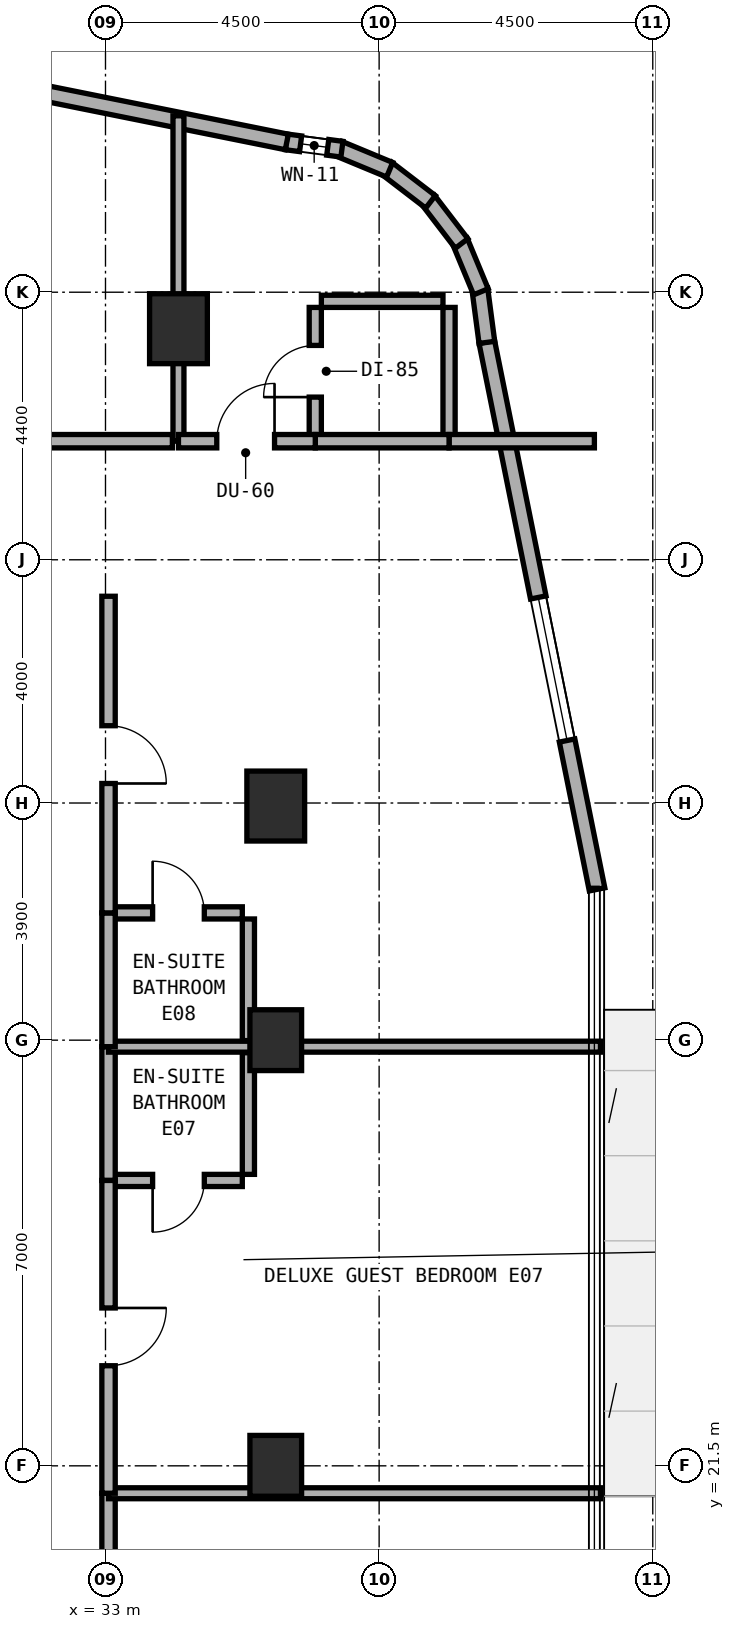
"""IFC4 building model, lengths in metres.
Left out: names, types, materials, properties, quantities, classifications, styles, units other than length and angle.
Written with IfcOpenShell. Run it as: python <this file> out.ifc"""

import sys

from ifc_helpers import new_model, si_unit, direction, frame, frame_2d, origin, origin_2d, place, context, subcontext, project, spatial, rectangle, extrude, element, fill, save


model = new_model("IFC4")
c1 = context("Model", 3, precision=1e-05, world=origin(), true_north=direction((0.0, 1.0)))
c2 = subcontext(c1, "Body", "Model", "MODEL_VIEW")
j1 = project(units=[si_unit("LENGTHUNIT", "METRE"), si_unit("PLANEANGLEUNIT", "RADIAN")], contexts=[c1])
p1 = place(None, origin())
s1 = spatial("IfcSite", under=j1, at=p1, CompositionType="ELEMENT")
p2 = place(p1, origin())
s2 = spatial("IfcBuilding", under=s1, at=p2, CompositionType="ELEMENT")
p3 = place(p2, frame((0.0, 0.0, 124.0)))
s3 = spatial("IfcBuildingStorey", under=s2, at=p3, CompositionType="ELEMENT", Elevation=124.0)
p4 = place(p3, frame((34.2, 40.2, 0.0), z_axis=(0.0, 0.0, 1.0), x_axis=(1.0, 0.0, 0.0)))
e1 = element("IfcColumn", 1, at=p4, inside=s3, PredefinedType="COLUMN", context=c2, shape_type="SweptSolid", body=[
    extrude(rectangle(XDim=0.95, YDim=1.15, at=origin_2d()), origin(), (0.0, 0.0, 1.0), 3.5),
])
for number, where, z_axis, x_axis in (
    (2, (35.8, 21.5, 0.0), (0.0, 0.0, 1.0), (1.0, 0.0, 0.0)),
    (3, (35.8, 28.5, 0.0), (0.0, 0.0, 1.0), (1.0, 0.0, 0.0)),
):
    element("IfcColumn", number, at=place(p3, frame(where, z_axis=z_axis, x_axis=x_axis)), inside=s3, PredefinedType="COLUMN", context=c2, shape_type="SweptSolid", body=[
        extrude(rectangle(XDim=0.85, YDim=1.0, at=origin_2d()), origin(), (0.0, 0.0, 1.0), 3.5),
    ])
p5 = place(p3, frame((35.8, 32.35, 0.0), z_axis=(0.0, 0.0, 1.0), x_axis=(1.0, 0.0, 0.0)))
e4 = element("IfcColumn", 4, at=p5, inside=s3, PredefinedType="COLUMN", context=c2, shape_type="SweptSolid", body=[
    extrude(rectangle(XDim=0.95, YDim=1.15, at=origin_2d()), origin(), (0.0, 0.0, 1.0), 3.5),
])
p6 = place(p3, frame((41.084, 30.98, 0.0), z_axis=(0.0, 0.0, 1.0), x_axis=(-0.197435082048, 0.980315963543, 0.0)))
e5 = element("IfcWall", 5, at=p6, inside=s3, PredefinedType="STANDARD", context=c2, shape_type="SweptSolid", body=[
    extrude(rectangle(XDim=9.183, YDim=0.26, at=frame_2d((4.591, 0.0))), origin(), (0.0, 0.0, 1.0), 3.22),
])
p7 = place(p6, frame((2.497, 0.0, 0.8)))
e6 = element("IfcOpeningElement", 6, at=p7, cuts=e5, PredefinedType="OPENING", context=c2, shape_type="SweptSolid", body=[
    extrude(rectangle(XDim=2.4, YDim=1.6, at=frame_2d((1.2, 0.8))), frame((0.0, 0.14, 0.0), z_axis=(0.0, -1.0, 0.0), x_axis=(1.0, 0.0, 0.0)), (0.0, 0.0, 1.0), 0.28),
])
p8 = place(p3, frame((39.272, 39.975, 0.0), z_axis=(0.0, 0.0, 1.0), x_axis=(-0.130953706898, 0.991388484223, 0.0)))
e7 = element("IfcWall", 7, at=p8, inside=s3, PredefinedType="STANDARD", context=c2, shape_type="SweptSolid", body=[
    extrude(rectangle(XDim=0.885, YDim=0.26, at=frame_2d((0.443, 0.0))), origin(), (0.0, 0.0, 1.0), 3.22),
])
p9 = place(p3, frame((39.174, 40.807, 0.0), z_axis=(0.0, 0.0, 1.0), x_axis=(-0.383290660547, 0.923627776508, 0.0)))
e8 = element("IfcWall", 8, at=p9, inside=s3, PredefinedType="STANDARD", context=c2, shape_type="SweptSolid", body=[
    extrude(rectangle(XDim=0.903, YDim=0.26, at=frame_2d((0.452, 0.0))), origin(), (0.0, 0.0, 1.0), 3.22),
])
p10 = place(p3, frame((38.856, 41.601, 0.0), z_axis=(0.0, 0.0, 1.0), x_axis=(-0.608624690463, 0.793458244748, 0.0)))
e9 = element("IfcWall", 9, at=p10, inside=s3, PredefinedType="STANDARD", context=c2, shape_type="SweptSolid", body=[
    extrude(rectangle(XDim=0.902, YDim=0.26, at=frame_2d((0.451, 0.0))), origin(), (0.0, 0.0, 1.0), 3.22),
])
p11 = place(p3, frame((38.345, 42.286, 0.0), z_axis=(0.0, 0.0, 1.0), x_axis=(-0.793558456666, 0.608494022858, 0.0)))
e10 = element("IfcWall", 10, at=p11, inside=s3, PredefinedType="STANDARD", context=c2, shape_type="SweptSolid", body=[
    extrude(rectangle(XDim=0.902, YDim=0.26, at=frame_2d((0.451, 0.0))), origin(), (0.0, 0.0, 1.0), 3.22),
])
p12 = place(p3, frame((37.673, 42.814, 0.0), z_axis=(0.0, 0.0, 1.0), x_axis=(-0.923683767999, 0.383155708213, 0.0)))
e11 = element("IfcWall", 11, at=p12, inside=s3, PredefinedType="STANDARD", context=c2, shape_type="SweptSolid", body=[
    extrude(rectangle(XDim=0.903, YDim=0.26, at=frame_2d((0.451, 0.0))), origin(), (0.0, 0.0, 1.0), 3.22),
])
p13 = place(p3, frame((36.888, 43.152, 0.0), z_axis=(0.0, 0.0, 1.0), x_axis=(-0.991487658083, 0.130200706103, 0.0)))
e12 = element("IfcWall", 12, at=p13, inside=s3, PredefinedType="STANDARD", context=c2, shape_type="SweptSolid", body=[
    extrude(rectangle(XDim=0.921, YDim=0.26, at=frame_2d((0.46, 0.0))), origin(), (0.0, 0.0, 1.0), 3.22),
])
p14 = place(p13, frame((0.235, 0.0, 0.85)))
e13 = element("IfcOpeningElement", 13, at=p14, cuts=e12, PredefinedType="OPENING", context=c2, shape_type="SweptSolid", body=[
    extrude(rectangle(XDim=0.45, YDim=1.5, at=frame_2d((0.225, 0.75))), frame((0.0, 0.14, 0.0), z_axis=(0.0, -1.0, 0.0), x_axis=(1.0, 0.0, 0.0)), (0.0, 0.0, 1.0), 0.28),
])
p15 = place(p3, frame((35.982, 43.271, 0.0), z_axis=(0.0, 0.0, 1.0), x_axis=(-0.980317172899, 0.197429077186, 0.0)))
e14 = element("IfcWall", 14, at=p15, inside=s3, PredefinedType="STANDARD", context=c2, shape_type="SweptSolid", body=[
    extrude(rectangle(XDim=9.117, YDim=0.26, at=frame_2d((4.559, 0.0))), origin(), (0.0, 0.0, 1.0), 3.22),
])
p16 = place(p15, frame((4.305, 0.0, 0.8)))
e15 = element("IfcOpeningElement", 15, at=p16, cuts=e14, PredefinedType="OPENING", context=c2, shape_type="SweptSolid", body=[
    extrude(rectangle(XDim=2.4, YDim=1.6, at=frame_2d((1.2, 0.8))), frame((0.0, 0.14, 0.0), z_axis=(0.0, -1.0, 0.0), x_axis=(1.0, 0.0, 0.0)), (0.0, 0.0, 1.0), 0.28),
])
p17 = place(p3, frame((16.3, 38.35, 0.0), z_axis=(0.0, 0.0, 1.0), x_axis=(1.0, 0.0, 0.0)))
e16 = element("IfcWall", 16, at=p17, inside=s3, PredefinedType="SOLIDWALL", context=c2, shape_type="SweptSolid", body=[
    extrude(rectangle(XDim=17.8, YDim=0.22, at=frame_2d((8.9, 0.0))), origin(), (0.0, 0.0, 1.0), 2.695),
])
p18 = place(p17, frame((7.573, 0.0, 0.0)))
e17 = element("IfcOpeningElement", 17, at=p18, cuts=e16, PredefinedType="OPENING", context=c2, shape_type="SweptSolid", body=[
    extrude(rectangle(XDim=0.95, YDim=2.1, at=frame_2d((0.475, 1.05))), frame((0.0, 0.12, 0.0), z_axis=(0.0, -1.0, 0.0), x_axis=(1.0, 0.0, 0.0)), (0.0, 0.0, 1.0), 0.24),
])
p19 = place(p3, frame((34.2, 38.35, 0.0), z_axis=(0.0, 0.0, 1.0), x_axis=(0.0, 1.0, 0.0)))
e18 = element("IfcWall", 18, at=p19, inside=s3, PredefinedType="SOLIDWALL", context=c2, shape_type="SweptSolid", body=[
    extrude(rectangle(XDim=5.351, YDim=0.18, at=frame_2d((2.675, 0.0))), origin(), (0.0, 0.0, 1.0), 2.695),
])
p20 = place(p3, frame((36.45, 38.45, 0.0), z_axis=(0.0, 0.0, 1.0), x_axis=(0.0, 1.0, 0.0)))
e19 = element("IfcWall", 19, at=p20, inside=s3, PredefinedType="PLUMBINGWALL", context=c2, shape_type="SweptSolid", body=[
    extrude(rectangle(XDim=2.1, YDim=0.2, at=frame_2d((1.05, 0.0))), origin(), (0.0, 0.0, 1.0), 3.22),
])
p21 = place(p20, frame((0.625, 0.0, 0.0)))
e20 = element("IfcOpeningElement", 20, at=p21, cuts=e19, PredefinedType="OPENING", context=c2, shape_type="SweptSolid", body=[
    extrude(rectangle(XDim=0.85, YDim=2.1, at=frame_2d((0.425, 1.05))), frame((0.0, 0.11, 0.0), z_axis=(0.0, -1.0, 0.0), x_axis=(1.0, 0.0, 0.0)), (0.0, 0.0, 1.0), 0.22),
])
p22 = place(p3, frame((36.55, 40.65, 0.0), z_axis=(0.0, 0.0, 1.0), x_axis=(1.0, 0.0, 0.0)))
e21 = element("IfcWall", 21, at=p22, inside=s3, PredefinedType="PLUMBINGWALL", context=c2, shape_type="SweptSolid", body=[
    extrude(rectangle(XDim=2.0, YDim=0.2, at=frame_2d((1.0, 0.0))), origin(), (0.0, 0.0, 1.0), 3.22),
])
p23 = place(p3, frame((38.65, 38.45, 0.0), z_axis=(0.0, 0.0, 1.0), x_axis=(0.0, 1.0, 0.0)))
e22 = element("IfcWall", 22, at=p23, inside=s3, PredefinedType="PLUMBINGWALL", context=c2, shape_type="SweptSolid", body=[
    extrude(rectangle(XDim=2.1, YDim=0.2, at=frame_2d((1.05, 0.0))), origin(), (0.0, 0.0, 1.0), 3.22),
])
p24 = place(p3, frame((38.65, 38.35, 0.0), z_axis=(0.0, 0.0, 1.0), x_axis=(1.0, 0.0, 0.0)))
e23 = element("IfcWall", 23, at=p24, inside=s3, PredefinedType="SOLIDWALL", context=c2, shape_type="SweptSolid", body=[
    extrude(rectangle(XDim=2.39, YDim=0.22, at=frame_2d((1.195, 0.0))), origin(), (0.0, 0.0, 1.0), 3.22),
])
p25 = place(p3, frame((36.45, 38.35, 0.0), z_axis=(0.0, 0.0, 1.0), x_axis=(1.0, 0.0, 0.0)))
e24 = element("IfcWall", 24, at=p25, inside=s3, PredefinedType="SOLIDWALL", context=c2, shape_type="SweptSolid", body=[
    extrude(rectangle(XDim=2.2, YDim=0.22, at=frame_2d((1.1, 0.0))), origin(), (0.0, 0.0, 1.0), 3.22),
])
p26 = place(p3, frame((34.2, 38.35, 0.0), z_axis=(0.0, 0.0, 1.0), x_axis=(1.0, 0.0, 0.0)))
e25 = element("IfcWall", 25, at=p26, inside=s3, PredefinedType="SOLIDWALL", context=c2, shape_type="SweptSolid", body=[
    extrude(rectangle(XDim=2.25, YDim=0.22, at=frame_2d((1.125, 0.0))), origin(), (0.0, 0.0, 1.0), 2.695),
])
p27 = place(p26, frame((0.63, 0.0, 0.0)))
e26 = element("IfcOpeningElement", 26, at=p27, cuts=e25, PredefinedType="OPENING", context=c2, shape_type="SweptSolid", body=[
    extrude(rectangle(XDim=0.95, YDim=2.1, at=frame_2d((0.475, 1.05))), frame((0.0, 0.12, 0.0), z_axis=(0.0, -1.0, 0.0), x_axis=(1.0, 0.0, 0.0)), (0.0, 0.0, 1.0), 0.24),
])
p28 = place(p3, frame((33.05, 16.4, 0.0), z_axis=(0.0, 0.0, 1.0), x_axis=(0.0, 1.0, 0.0)))
e27 = element("IfcWall", 27, at=p28, inside=s3, PredefinedType="SOLIDWALL", context=c2, shape_type="SweptSolid", body=[
    extrude(rectangle(XDim=4.649, YDim=0.22, at=frame_2d((2.325, 0.0))), origin(), (0.0, 0.0, 1.0), 2.695),
])
p29 = place(p28, frame((1.85, 0.0, 0.0)))
e28 = element("IfcOpeningElement", 28, at=p29, cuts=e27, PredefinedType="OPENING", context=c2, shape_type="SweptSolid", body=[
    extrude(rectangle(XDim=0.95, YDim=2.1, at=frame_2d((0.475, 1.05))), frame((0.0, 0.12, 0.0), z_axis=(0.0, -1.0, 0.0), x_axis=(1.0, 0.0, 0.0)), (0.0, 0.0, 1.0), 0.24),
])
p30 = place(p3, frame((33.05, 21.049, 0.0), z_axis=(0.0, 0.0, 1.0), x_axis=(1.0, 0.0, 0.0)))
e29 = element("IfcWall", 29, at=p30, inside=s3, PredefinedType="SOLIDWALL", context=c2, shape_type="SweptSolid", body=[
    extrude(rectangle(XDim=8.09, YDim=0.18, at=frame_2d((4.045, 0.0))), origin(), (0.0, 0.0, 1.0), 2.835),
])
p31 = place(p3, frame((33.15, 26.193, 0.0), z_axis=(0.0, 0.0, 1.0), x_axis=(1.0, 0.0, 0.0)))
e30 = element("IfcWall", 30, at=p31, inside=s3, PredefinedType="PLUMBINGWALL", context=c2, shape_type="SweptSolid", body=[
    extrude(rectangle(XDim=2.1, YDim=0.2, at=frame_2d((1.05, 0.0))), origin(), (0.0, 0.0, 1.0), 3.22),
])
p32 = place(p31, frame((0.625, 0.0, 0.0)))
e31 = element("IfcOpeningElement", 31, at=p32, cuts=e30, PredefinedType="OPENING", context=c2, shape_type="SweptSolid", body=[
    extrude(rectangle(XDim=0.85, YDim=2.1, at=frame_2d((0.425, 1.05))), frame((0.0, 0.11, 0.0), z_axis=(0.0, -1.0, 0.0), x_axis=(1.0, 0.0, 0.0)), (0.0, 0.0, 1.0), 0.22),
])
p33 = place(p3, frame((35.35, 26.293, 0.0), z_axis=(0.0, 0.0, 1.0), x_axis=(0.0, 1.0, 0.0)))
e32 = element("IfcWall", 32, at=p33, inside=s3, PredefinedType="PLUMBINGWALL", context=c2, shape_type="SweptSolid", body=[
    extrude(rectangle(XDim=2.0, YDim=0.2, at=frame_2d((1.0, 0.0))), origin(), (0.0, 0.0, 1.0), 3.22),
])
p34 = place(p3, frame((33.05, 26.193, 0.0), z_axis=(0.0, 0.0, 1.0), x_axis=(0.0, 1.0, 0.0)))
e33 = element("IfcWall", 33, at=p34, inside=s3, PredefinedType="SOLIDWALL", context=c2, shape_type="SweptSolid", body=[
    extrude(rectangle(XDim=2.2, YDim=0.22, at=frame_2d((1.1, 0.0))), origin(), (0.0, 0.0, 1.0), 3.22),
])
p35 = place(p3, frame((33.05, 21.049, 0.0), z_axis=(0.0, 0.0, 1.0), x_axis=(0.0, 1.0, 0.0)))
e34 = element("IfcWall", 34, at=p35, inside=s3, PredefinedType="SOLIDWALL", context=c2, shape_type="SweptSolid", body=[
    extrude(rectangle(XDim=5.144, YDim=0.22, at=frame_2d((2.572, 0.0))), origin(), (0.0, 0.0, 1.0), 2.695),
])
p36 = place(p35, frame((2.097, 0.0, 0.0)))
e35 = element("IfcOpeningElement", 35, at=p36, cuts=e34, PredefinedType="OPENING", context=c2, shape_type="SweptSolid", body=[
    extrude(rectangle(XDim=0.95, YDim=2.1, at=frame_2d((0.475, 1.05))), frame((0.0, 0.12, 0.0), z_axis=(0.0, -1.0, 0.0), x_axis=(1.0, 0.0, 0.0)), (0.0, 0.0, 1.0), 0.24),
])
p37 = place(p3, frame((33.05, 28.393, 0.0), z_axis=(0.0, 0.0, 1.0), x_axis=(1.0, 0.0, 0.0)))
e36 = element("IfcWall", 36, at=p37, inside=s3, PredefinedType="SOLIDWALL", context=c2, shape_type="SweptSolid", body=[
    extrude(rectangle(XDim=8.09, YDim=0.18, at=frame_2d((4.045, 0.0))), origin(), (0.0, 0.0, 1.0), 2.695),
])
p38 = place(p3, frame((33.15, 30.593, 0.0), z_axis=(0.0, 0.0, 1.0), x_axis=(1.0, 0.0, 0.0)))
e37 = element("IfcWall", 37, at=p38, inside=s3, PredefinedType="PLUMBINGWALL", context=c2, shape_type="SweptSolid", body=[
    extrude(rectangle(XDim=2.1, YDim=0.2, at=frame_2d((1.05, 0.0))), origin(), (0.0, 0.0, 1.0), 3.22),
])
p39 = place(p38, frame((0.625, 0.0, 0.0)))
e38 = element("IfcOpeningElement", 38, at=p39, cuts=e37, PredefinedType="OPENING", context=c2, shape_type="SweptSolid", body=[
    extrude(rectangle(XDim=0.85, YDim=2.1, at=frame_2d((0.425, 1.05))), frame((0.0, 0.11, 0.0), z_axis=(0.0, -1.0, 0.0), x_axis=(1.0, 0.0, 0.0)), (0.0, 0.0, 1.0), 0.22),
])
p40 = place(p3, frame((35.35, 28.493, 0.0), z_axis=(0.0, 0.0, 1.0), x_axis=(0.0, 1.0, 0.0)))
e39 = element("IfcWall", 39, at=p40, inside=s3, PredefinedType="PLUMBINGWALL", context=c2, shape_type="SweptSolid", body=[
    extrude(rectangle(XDim=2.0, YDim=0.2, at=frame_2d((1.0, 0.0))), origin(), (0.0, 0.0, 1.0), 2.695),
])
p41 = place(p3, frame((33.05, 28.393, 0.0), z_axis=(0.0, 0.0, 1.0), x_axis=(0.0, 1.0, 0.0)))
e40 = element("IfcWall", 40, at=p41, inside=s3, PredefinedType="SOLIDWALL", context=c2, shape_type="SweptSolid", body=[
    extrude(rectangle(XDim=2.2, YDim=0.22, at=frame_2d((1.1, 0.0))), origin(), (0.0, 0.0, 1.0), 2.695),
])
p42 = place(p3, frame((33.05, 30.593, 0.0), z_axis=(0.0, 0.0, 1.0), x_axis=(0.0, 1.0, 0.0)))
e41 = element("IfcWall", 41, at=p42, inside=s3, PredefinedType="SOLIDWALL", context=c2, shape_type="SweptSolid", body=[
    extrude(rectangle(XDim=5.207, YDim=0.22, at=frame_2d((2.604, 0.0))), origin(), (0.0, 0.0, 1.0), 2.695),
])
p43 = place(p42, frame((2.128, 0.0, 0.0)))
e42 = element("IfcOpeningElement", 42, at=p43, cuts=e41, PredefinedType="OPENING", context=c2, shape_type="SweptSolid", body=[
    extrude(rectangle(XDim=0.95, YDim=2.1, at=frame_2d((0.475, 1.05))), frame((0.0, 0.12, 0.0), z_axis=(0.0, -1.0, 0.0), x_axis=(1.0, 0.0, 0.0)), (0.0, 0.0, 1.0), 0.24),
])
p44 = place(p7, origin())
e43 = element("IfcWindow", 43, at=p44, inside=s3, PartitioningType="SINGLE_PANEL", PredefinedType="WINDOW", context=c2, shape_type="SweptSolid", body=[
    extrude(rectangle(XDim=2.4, YDim=1.6, at=frame_2d((1.2, 0.8))), frame((0.0, 0.03, 0.0), z_axis=(0.0, -1.0, 0.0), x_axis=(1.0, 0.0, 0.0)), (0.0, 0.0, 1.0), 0.06),
])
fill(e6, e43)
p45 = place(p14, origin())
e44 = element("IfcWindow", 44, at=p45, inside=s3, PartitioningType="SINGLE_PANEL", PredefinedType="WINDOW", context=c2, shape_type="SweptSolid", body=[
    extrude(rectangle(XDim=0.45, YDim=1.5, at=frame_2d((0.225, 0.75))), frame((0.0, 0.03, 0.0), z_axis=(0.0, -1.0, 0.0), x_axis=(1.0, 0.0, 0.0)), (0.0, 0.0, 1.0), 0.06),
])
fill(e13, e44)
p46 = place(p21, origin())
e45 = element("IfcDoor", 45, at=p46, inside=s3, OperationType="SINGLE_SWING_LEFT", PredefinedType="DOOR", context=c2, shape_type="SweptSolid", body=[
    extrude(rectangle(XDim=0.85, YDim=2.1, at=frame_2d((0.425, 1.05))), frame((0.0, 0.025, 0.0), z_axis=(0.0, -1.0, 0.0), x_axis=(1.0, 0.0, 0.0)), (0.0, 0.0, 1.0), 0.05),
])
fill(e20, e45)
p47 = place(p27, origin())
e46 = element("IfcDoor", 46, at=p47, inside=s3, OperationType="SINGLE_SWING_RIGHT", PredefinedType="DOOR", context=c2, shape_type="SweptSolid", body=[
    extrude(rectangle(XDim=0.95, YDim=2.1, at=frame_2d((0.475, 1.05))), frame((0.0, 0.025, 0.0), z_axis=(0.0, -1.0, 0.0), x_axis=(1.0, 0.0, 0.0)), (0.0, 0.0, 1.0), 0.05),
])
fill(e26, e46)
p48 = place(p32, frame((0.85, 0.0, 0.0), z_axis=(0.0, 0.0, 1.0), x_axis=(-1.0, 0.0, 0.0)))
e47 = element("IfcDoor", 47, at=p48, inside=s3, OperationType="SINGLE_SWING_RIGHT", PredefinedType="DOOR", context=c2, shape_type="SweptSolid", body=[
    extrude(rectangle(XDim=0.85, YDim=2.1, at=frame_2d((0.425, 1.05))), frame((0.0, 0.025, 0.0), z_axis=(0.0, -1.0, 0.0), x_axis=(1.0, 0.0, 0.0)), (0.0, 0.0, 1.0), 0.05),
])
fill(e31, e47)
p49 = place(p36, frame((0.95, 0.0, 0.0), z_axis=(0.0, 0.0, 1.0), x_axis=(-1.0, 0.0, 0.0)))
e48 = element("IfcDoor", 48, at=p49, inside=s3, OperationType="SINGLE_SWING_LEFT", PredefinedType="DOOR", context=c2, shape_type="SweptSolid", body=[
    extrude(rectangle(XDim=0.95, YDim=2.1, at=frame_2d((0.475, 1.05))), frame((0.0, 0.025, 0.0), z_axis=(0.0, -1.0, 0.0), x_axis=(1.0, 0.0, 0.0)), (0.0, 0.0, 1.0), 0.05),
])
fill(e35, e48)
p50 = place(p39, origin())
e49 = element("IfcDoor", 49, at=p50, inside=s3, OperationType="SINGLE_SWING_LEFT", PredefinedType="DOOR", context=c2, shape_type="SweptSolid", body=[
    extrude(rectangle(XDim=0.85, YDim=2.1, at=frame_2d((0.425, 1.05))), frame((0.0, 0.025, 0.0), z_axis=(0.0, -1.0, 0.0), x_axis=(1.0, 0.0, 0.0)), (0.0, 0.0, 1.0), 0.05),
])
fill(e38, e49)
p51 = place(p43, frame((0.95, 0.0, 0.0), z_axis=(0.0, 0.0, 1.0), x_axis=(-1.0, 0.0, 0.0)))
e50 = element("IfcDoor", 50, at=p51, inside=s3, OperationType="SINGLE_SWING_RIGHT", PredefinedType="DOOR", context=c2, shape_type="SweptSolid", body=[
    extrude(rectangle(XDim=0.95, YDim=2.1, at=frame_2d((0.475, 1.05))), frame((0.0, 0.025, 0.0), z_axis=(0.0, -1.0, 0.0), x_axis=(1.0, 0.0, 0.0)), (0.0, 0.0, 1.0), 0.05),
])
fill(e42, e50)
save(model, sys.argv[1])
